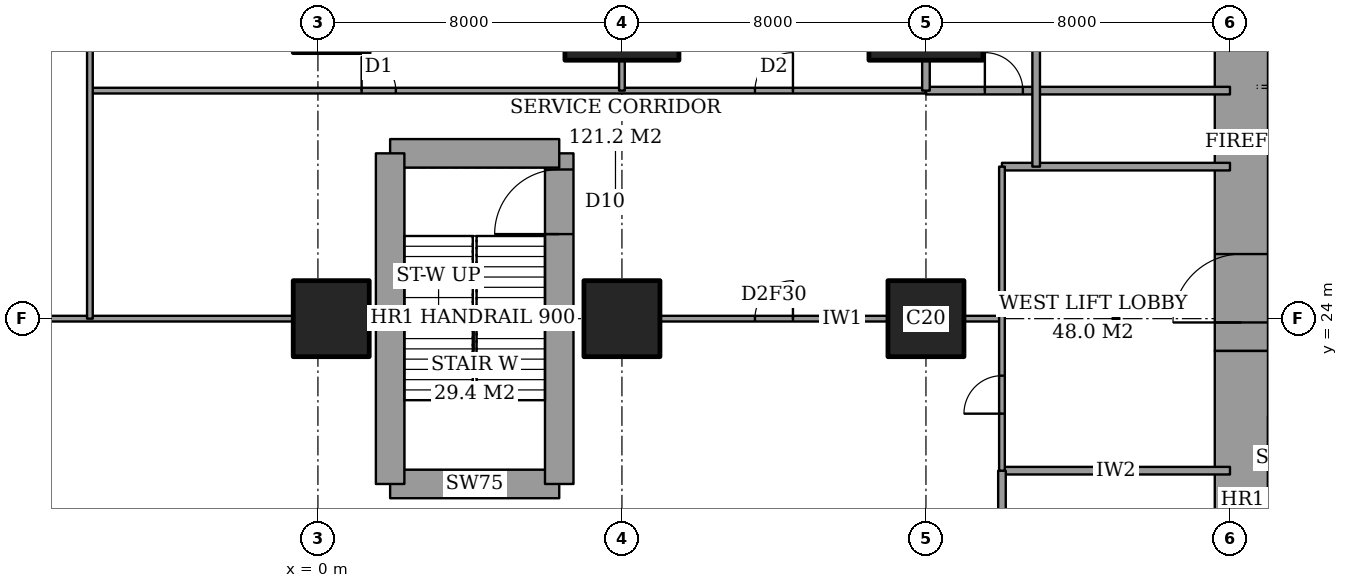
"""IFC4 building model, lengths in metres.
Left out: names, types, materials, properties, quantities, classifications, styles, units other than length and angle.
Written with IfcOpenShell. Run it as: python <this file> out.ifc"""

import sys

from ifc_helpers import new_model, si_unit, direction, frame, frame_2d, origin, origin_2d, place, context, subcontext, project, spatial, rectangle, extrude, element, fill, save


model = new_model("IFC4")
c1 = context("Model", 3, precision=1e-05, world=origin(), true_north=direction((0.0, 1.0)))
c2 = subcontext(c1, "Body", "Model", "MODEL_VIEW")
j1 = project(units=[si_unit("LENGTHUNIT", "METRE"), si_unit("PLANEANGLEUNIT", "RADIAN")], contexts=[c1])
p1 = place(None, origin())
s1 = spatial("IfcSite", under=j1, at=p1, CompositionType="ELEMENT")
p2 = place(p1, origin())
s2 = spatial("IfcBuilding", under=s1, at=p2, CompositionType="ELEMENT")
p3 = place(p2, origin())
s3 = spatial("IfcBuildingStorey", under=s2, at=p3, CompositionType="ELEMENT", Elevation=0.0)
for number, where, z_axis, x_axis in (
    (1, (0.35, 24.0, 0.0), (0.0, 0.0, 1.0), (1.0, 0.0, 0.0)),
    (2, (8.0, 24.0, 0.0), (0.0, 0.0, 1.0), (1.0, 0.0, 0.0)),
):
    element("IfcColumn", number, at=place(p3, frame(where, z_axis=z_axis, x_axis=x_axis)), inside=s3, PredefinedType="COLUMN", context=c2, shape_type="SweptSolid", body=[
        extrude(rectangle(XDim=2.0, YDim=2.0, at=origin_2d()), origin(), (0.0, 0.0, 1.0), 6.0),
    ])
p4 = place(p3, frame((8.0, 32.0, 0.0), z_axis=(0.0, 0.0, 1.0), x_axis=(1.0, 0.0, 0.0)))
e3 = element("IfcColumn", 3, at=p4, inside=s3, PredefinedType="COLUMN", context=c2, shape_type="SweptSolid", body=[
    extrude(rectangle(XDim=3.0, YDim=2.4, at=origin_2d()), origin(), (0.0, 0.0, 1.0), 6.0),
])
p5 = place(p3, frame((16.0, 24.0, 0.0), z_axis=(0.0, 0.0, 1.0), x_axis=(1.0, 0.0, 0.0)))
e4 = element("IfcColumn", 4, at=p5, inside=s3, PredefinedType="COLUMN", context=c2, shape_type="SweptSolid", body=[
    extrude(rectangle(XDim=2.0, YDim=2.0, at=origin_2d()), origin(), (0.0, 0.0, 1.0), 6.0),
])
p6 = place(p3, frame((16.0, 32.0, 0.0), z_axis=(0.0, 0.0, 1.0), x_axis=(1.0, 0.0, 0.0)))
e5 = element("IfcColumn", 5, at=p6, inside=s3, PredefinedType="COLUMN", context=c2, shape_type="SweptSolid", body=[
    extrude(rectangle(XDim=3.0, YDim=2.4, at=origin_2d()), origin(), (0.0, 0.0, 1.0), 6.0),
])
p7 = place(p3, frame((24.3, 13.0, 0.0), z_axis=(0.0, 0.0, 1.0), x_axis=(0.0, 1.0, 0.0)))
e6 = element("IfcWall", 6, at=p7, inside=s3, PredefinedType="SHEAR", context=c2, shape_type="SweptSolid", body=[
    extrude(rectangle(XDim=10.15, YDim=1.4, at=frame_2d((5.075, 0.0))), origin(), (0.0, 0.0, 1.0), 6.0),
])
p8 = place(p3, frame((24.3, 23.15, 0.0), z_axis=(0.0, 0.0, 1.0), x_axis=(0.0, 1.0, 0.0)))
e7 = element("IfcWall", 7, at=p8, inside=s3, PredefinedType="SHEAR", context=c2, shape_type="SweptSolid", body=[
    extrude(rectangle(XDim=11.85, YDim=1.4, at=frame_2d((5.925, 0.0))), origin(), (0.0, 0.0, 1.0), 6.0),
])
p9 = place(p8, frame((0.75, 0.0, 0.0)))
e8 = element("IfcOpeningElement", 8, at=p9, cuts=e7, PredefinedType="OPENING", context=c2, shape_type="SweptSolid", body=[
    extrude(rectangle(XDim=1.8, YDim=2.4, at=frame_2d((0.9, 1.2))), frame((0.0, 0.71, 0.0), z_axis=(0.0, -1.0, 0.0), x_axis=(1.0, 0.0, 0.0)), (0.0, 0.0, 1.0), 1.42),
])
p10 = place(p3, frame((1.9, 19.65, 0.0), z_axis=(0.0, 0.0, 1.0), x_axis=(1.0, 0.0, 0.0)))
e9 = element("IfcWall", 9, at=p10, inside=s3, PredefinedType="SHEAR", context=c2, shape_type="SweptSolid", body=[
    extrude(rectangle(XDim=4.45, YDim=0.75, at=frame_2d((2.225, 0.0))), origin(), (0.0, 0.0, 1.0), 6.0),
])
p11 = place(p3, frame((6.35, 19.65, 0.0), z_axis=(0.0, 0.0, 1.0), x_axis=(0.0, 1.0, 0.0)))
e10 = element("IfcWall", 10, at=p11, inside=s3, PredefinedType="SHEAR", context=c2, shape_type="SweptSolid", body=[
    extrude(rectangle(XDim=8.7, YDim=0.75, at=frame_2d((4.35, 0.0))), origin(), (0.0, 0.0, 1.0), 6.0),
])
p12 = place(p11, frame((6.575, 0.0, 0.0)))
e11 = element("IfcOpeningElement", 11, at=p12, cuts=e10, PredefinedType="OPENING", context=c2, shape_type="SweptSolid", body=[
    extrude(rectangle(XDim=1.7, YDim=2.1, at=frame_2d((0.85, 1.05))), frame((0.0, 0.385, 0.0), z_axis=(0.0, -1.0, 0.0), x_axis=(1.0, 0.0, 0.0)), (0.0, 0.0, 1.0), 0.77),
])
p13 = place(p3, frame((6.35, 28.35, 0.0), z_axis=(0.0, 0.0, 1.0), x_axis=(-1.0, 0.0, 0.0)))
e12 = element("IfcWall", 12, at=p13, inside=s3, PredefinedType="SHEAR", context=c2, shape_type="SweptSolid", body=[
    extrude(rectangle(XDim=4.45, YDim=0.75, at=frame_2d((2.225, 0.0))), origin(), (0.0, 0.0, 1.0), 6.0),
])
p14 = place(p3, frame((1.9, 28.35, 0.0), z_axis=(0.0, 0.0, 1.0), x_axis=(0.0, -1.0, 0.0)))
e13 = element("IfcWall", 13, at=p14, inside=s3, PredefinedType="SHEAR", context=c2, shape_type="SweptSolid", body=[
    extrude(rectangle(XDim=8.7, YDim=0.75, at=frame_2d((4.35, 0.0))), origin(), (0.0, 0.0, 1.0), 6.0),
])
p15 = place(p3, frame((18.0, 20.0, 0.0), z_axis=(0.0, 0.0, 1.0), x_axis=(1.0, 0.0, 0.0)))
e14 = element("IfcWall", 14, at=p15, inside=s3, PredefinedType="PARTITIONING", context=c2, shape_type="SweptSolid", body=[
    extrude(rectangle(XDim=6.0, YDim=0.2, at=frame_2d((3.0, 0.0))), origin(), (0.0, 0.0, 1.0), 5.7),
])
p16 = place(p3, frame((-7.45, 24.0, 0.0), z_axis=(0.0, 0.0, 1.0), x_axis=(1.0, 0.0, 0.0)))
e15 = element("IfcWall", 15, at=p16, inside=s3, PredefinedType="PARTITIONING", context=c2, shape_type="SweptSolid", body=[
    extrude(rectangle(XDim=6.8, YDim=0.15, at=frame_2d((3.4, 0.0))), origin(), (0.0, 0.0, 1.0), 4.3),
])
p17 = place(p3, frame((9.0, 24.0, 0.0), z_axis=(0.0, 0.0, 1.0), x_axis=(1.0, 0.0, 0.0)))
e16 = element("IfcWall", 16, at=p17, inside=s3, PredefinedType="PARTITIONING", context=c2, shape_type="SweptSolid", body=[
    extrude(rectangle(XDim=6.0, YDim=0.15, at=frame_2d((3.0, 0.0))), origin(), (0.0, 0.0, 1.0), 4.3),
])
p18 = place(p17, frame((2.5, 0.0, 0.0)))
e17 = element("IfcOpeningElement", 17, at=p18, cuts=e16, PredefinedType="OPENING", context=c2, shape_type="SweptSolid", body=[
    extrude(rectangle(XDim=1.0, YDim=2.1, at=frame_2d((0.5, 1.05))), frame((0.0, 0.085, 0.0), z_axis=(0.0, -1.0, 0.0), x_axis=(1.0, 0.0, 0.0)), (0.0, 0.0, 1.0), 0.17),
])
p19 = place(p3, frame((17.0, 24.0, 0.0), z_axis=(0.0, 0.0, 1.0), x_axis=(1.0, 0.0, 0.0)))
e18 = element("IfcWall", 18, at=p19, inside=s3, PredefinedType="PARTITIONING", context=c2, shape_type="SweptSolid", body=[
    extrude(rectangle(XDim=1.0, YDim=0.15, at=frame_2d((0.5, 0.0))), origin(), (0.0, 0.0, 1.0), 5.7),
])
p20 = place(p3, frame((18.0, 28.0, 0.0), z_axis=(0.0, 0.0, 1.0), x_axis=(1.0, 0.0, 0.0)))
e19 = element("IfcWall", 19, at=p20, inside=s3, PredefinedType="PARTITIONING", context=c2, shape_type="SweptSolid", body=[
    extrude(rectangle(XDim=6.0, YDim=0.2, at=frame_2d((3.0, 0.0))), origin(), (0.0, 0.0, 1.0), 5.7),
])
p21 = place(p3, frame((16.0, 30.0, 0.0), z_axis=(0.0, 0.0, 1.0), x_axis=(1.0, 0.0, 0.0)))
e20 = element("IfcWall", 20, at=p21, inside=s3, PredefinedType="PARTITIONING", context=c2, shape_type="SweptSolid", body=[
    extrude(rectangle(XDim=8.0, YDim=0.2, at=frame_2d((4.0, 0.0))), origin(), (0.0, 0.0, 1.0), 5.7),
])
p22 = place(p21, frame((1.55, 0.0, 0.0)))
e21 = element("IfcOpeningElement", 21, at=p22, cuts=e20, PredefinedType="OPENING", context=c2, shape_type="SweptSolid", body=[
    extrude(rectangle(XDim=1.0, YDim=2.1, at=frame_2d((0.5, 1.05))), frame((0.0, 0.11, 0.0), z_axis=(0.0, -1.0, 0.0), x_axis=(1.0, 0.0, 0.0)), (0.0, 0.0, 1.0), 0.22),
])
p23 = place(p3, frame((-6.0, 30.0, 0.0), z_axis=(0.0, 0.0, 1.0), x_axis=(1.0, 0.0, 0.0)))
e22 = element("IfcWall", 22, at=p23, inside=s3, PredefinedType="PARTITIONING", context=c2, shape_type="SweptSolid", body=[
    extrude(rectangle(XDim=22.0, YDim=0.15, at=frame_2d((11.0, 0.0))), origin(), (0.0, 0.0, 1.0), 5.7),
])
p24 = place(p23, frame((7.15, 0.0, 0.0)))
e23 = element("IfcOpeningElement", 23, at=p24, cuts=e22, PredefinedType="OPENING", context=c2, shape_type="SweptSolid", body=[
    extrude(rectangle(XDim=0.9, YDim=2.1, at=frame_2d((0.45, 1.05))), frame((0.0, 0.085, 0.0), z_axis=(0.0, -1.0, 0.0), x_axis=(1.0, 0.0, 0.0)), (0.0, 0.0, 1.0), 0.17),
])
p25 = place(p23, frame((17.5, 0.0, 0.0)))
e24 = element("IfcOpeningElement", 24, at=p25, cuts=e22, PredefinedType="OPENING", context=c2, shape_type="SweptSolid", body=[
    extrude(rectangle(XDim=1.0, YDim=2.1, at=frame_2d((0.5, 1.05))), frame((0.0, 0.085, 0.0), z_axis=(0.0, -1.0, 0.0), x_axis=(1.0, 0.0, 0.0)), (0.0, 0.0, 1.0), 0.17),
])
p26 = place(p3, frame((-6.0, 24.0, 0.0), z_axis=(0.0, 0.0, 1.0), x_axis=(0.0, 1.0, 0.0)))
e25 = element("IfcWall", 25, at=p26, inside=s3, PredefinedType="PARTITIONING", context=c2, shape_type="SweptSolid", body=[
    extrude(rectangle(XDim=24.25, YDim=0.15, at=frame_2d((12.125, 0.0))), origin(), (0.0, 0.0, 1.0), 5.7),
])
p27 = place(p26, frame((21.675, 0.0, 0.0)))
e26 = element("IfcOpeningElement", 26, at=p27, cuts=e25, PredefinedType="OPENING", context=c2, shape_type="SweptSolid", body=[
    extrude(rectangle(XDim=0.9, YDim=2.1, at=frame_2d((0.45, 1.05))), frame((0.0, 0.085, 0.0), z_axis=(0.0, -1.0, 0.0), x_axis=(1.0, 0.0, 0.0)), (0.0, 0.0, 1.0), 0.17),
])
p28 = place(p3, frame((8.0, 30.0, 0.0), z_axis=(0.0, 0.0, 1.0), x_axis=(0.0, 1.0, 0.0)))
e27 = element("IfcWall", 27, at=p28, inside=s3, PredefinedType="PARTITIONING", context=c2, shape_type="SweptSolid", body=[
    extrude(rectangle(XDim=0.8, YDim=0.15, at=frame_2d((0.4, 0.0))), origin(), (0.0, 0.0, 1.0), 4.3),
])
p29 = place(p3, frame((16.0, 30.0, 0.0), z_axis=(0.0, 0.0, 1.0), x_axis=(0.0, 1.0, 0.0)))
e28 = element("IfcWall", 28, at=p29, inside=s3, PredefinedType="PARTITIONING", context=c2, shape_type="SweptSolid", body=[
    extrude(rectangle(XDim=0.8, YDim=0.2, at=frame_2d((0.4, 0.0))), origin(), (0.0, 0.0, 1.0), 4.3),
])
p30 = place(p3, frame((18.0, 0.0, 0.0), z_axis=(0.0, 0.0, 1.0), x_axis=(0.0, 1.0, 0.0)))
e29 = element("IfcWall", 29, at=p30, inside=s3, PredefinedType="PARTITIONING", context=c2, shape_type="SweptSolid", body=[
    extrude(rectangle(XDim=20.0, YDim=0.2, at=frame_2d((10.0, 0.0))), origin(), (0.0, 0.0, 1.0), 5.7),
])
p31 = place(p3, frame((18.0, 20.0, 0.0), z_axis=(0.0, 0.0, 1.0), x_axis=(0.0, 1.0, 0.0)))
e30 = element("IfcWall", 30, at=p31, inside=s3, PredefinedType="PARTITIONING", context=c2, shape_type="SweptSolid", body=[
    extrude(rectangle(XDim=8.0, YDim=0.15, at=frame_2d((4.0, 0.0))), origin(), (0.0, 0.0, 1.0), 5.7),
])
p32 = place(p31, frame((1.5, 0.0, 0.0)))
e31 = element("IfcOpeningElement", 31, at=p32, cuts=e30, PredefinedType="OPENING", context=c2, shape_type="SweptSolid", body=[
    extrude(rectangle(XDim=1.0, YDim=2.1, at=frame_2d((0.5, 1.05))), frame((0.0, 0.085, 0.0), z_axis=(0.0, -1.0, 0.0), x_axis=(1.0, 0.0, 0.0)), (0.0, 0.0, 1.0), 0.17),
])
p33 = place(p3, frame((18.9, 28.0, 0.0), z_axis=(0.0, 0.0, 1.0), x_axis=(0.0, 1.0, 0.0)))
e32 = element("IfcWall", 32, at=p33, inside=s3, PredefinedType="PARTITIONING", context=c2, shape_type="SweptSolid", body=[
    extrude(rectangle(XDim=16.0, YDim=0.2, at=frame_2d((8.0, 0.0))), origin(), (0.0, 0.0, 1.0), 5.7),
])
p34 = place(p33, frame((3.55, 0.0, 0.0)))
e33 = element("IfcOpeningElement", 33, at=p34, cuts=e32, PredefinedType="OPENING", context=c2, shape_type="SweptSolid", body=[
    extrude(rectangle(XDim=0.9, YDim=2.1, at=frame_2d((0.45, 1.05))), frame((0.0, 0.11, 0.0), z_axis=(0.0, -1.0, 0.0), x_axis=(1.0, 0.0, 0.0)), (0.0, 0.0, 1.0), 0.22),
])
p35 = place(p33, frame((7.55, 0.0, 0.0)))
e34 = element("IfcOpeningElement", 34, at=p35, cuts=e32, PredefinedType="OPENING", context=c2, shape_type="SweptSolid", body=[
    extrude(rectangle(XDim=0.9, YDim=2.1, at=frame_2d((0.45, 1.05))), frame((0.0, 0.11, 0.0), z_axis=(0.0, -1.0, 0.0), x_axis=(1.0, 0.0, 0.0)), (0.0, 0.0, 1.0), 0.22),
])
p36 = place(p33, frame((11.05, 0.0, 0.0)))
e35 = element("IfcOpeningElement", 35, at=p36, cuts=e32, PredefinedType="OPENING", context=c2, shape_type="SweptSolid", body=[
    extrude(rectangle(XDim=0.9, YDim=2.1, at=frame_2d((0.45, 1.05))), frame((0.0, 0.11, 0.0), z_axis=(0.0, -1.0, 0.0), x_axis=(1.0, 0.0, 0.0)), (0.0, 0.0, 1.0), 0.22),
])
p37 = place(p32, origin())
e36 = element("IfcDoor", 36, at=p37, inside=s3, OperationType="SINGLE_SWING_RIGHT", PredefinedType="DOOR", context=c2, shape_type="SweptSolid", body=[
    extrude(rectangle(XDim=1.0, YDim=2.1, at=frame_2d((0.5, 1.05))), frame((0.0, 0.025, 0.0), z_axis=(0.0, -1.0, 0.0), x_axis=(1.0, 0.0, 0.0)), (0.0, 0.0, 1.0), 0.05),
])
fill(e31, e36)
p38 = place(p18, origin())
e37 = element("IfcDoor", 37, at=p38, inside=s3, OperationType="SINGLE_SWING_LEFT", PredefinedType="DOOR", context=c2, shape_type="SweptSolid", body=[
    extrude(rectangle(XDim=1.0, YDim=2.1, at=frame_2d((0.5, 1.05))), frame((0.0, 0.025, 0.0), z_axis=(0.0, -1.0, 0.0), x_axis=(1.0, 0.0, 0.0)), (0.0, 0.0, 1.0), 0.05),
])
fill(e17, e37)
p39 = place(p24, origin())
e38 = element("IfcDoor", 38, at=p39, inside=s3, OperationType="SINGLE_SWING_RIGHT", PredefinedType="DOOR", context=c2, shape_type="SweptSolid", body=[
    extrude(rectangle(XDim=0.9, YDim=2.1, at=frame_2d((0.45, 1.05))), frame((0.0, 0.025, 0.0), z_axis=(0.0, -1.0, 0.0), x_axis=(1.0, 0.0, 0.0)), (0.0, 0.0, 1.0), 0.05),
])
fill(e23, e38)
p40 = place(p25, origin())
e39 = element("IfcDoor", 39, at=p40, inside=s3, OperationType="SINGLE_SWING_LEFT", PredefinedType="DOOR", context=c2, shape_type="SweptSolid", body=[
    extrude(rectangle(XDim=1.0, YDim=2.1, at=frame_2d((0.5, 1.05))), frame((0.0, 0.025, 0.0), z_axis=(0.0, -1.0, 0.0), x_axis=(1.0, 0.0, 0.0)), (0.0, 0.0, 1.0), 0.05),
])
fill(e24, e39)
p41 = place(p22, origin())
e40 = element("IfcDoor", 40, at=p41, inside=s3, OperationType="SINGLE_SWING_RIGHT", PredefinedType="DOOR", context=c2, shape_type="SweptSolid", body=[
    extrude(rectangle(XDim=1.0, YDim=2.1, at=frame_2d((0.5, 1.05))), frame((0.0, 0.025, 0.0), z_axis=(0.0, -1.0, 0.0), x_axis=(1.0, 0.0, 0.0)), (0.0, 0.0, 1.0), 0.05),
])
fill(e21, e40)
p42 = place(p9, origin())
e41 = element("IfcDoor", 41, at=p42, inside=s3, OperationType="DOUBLE_DOOR_DOUBLE_SWING", PredefinedType="DOOR", context=c2, shape_type="SweptSolid", body=[
    extrude(rectangle(XDim=1.8, YDim=2.4, at=frame_2d((0.9, 1.2))), frame((0.0, -0.175, 0.0), z_axis=(0.0, -1.0, 0.0), x_axis=(1.0, 0.0, 0.0)), (0.0, 0.0, 1.0), 0.05),
])
fill(e8, e41)
p43 = place(p12, origin())
e42 = element("IfcDoor", 42, at=p43, inside=s3, OperationType="DOUBLE_DOOR_SINGLE_SWING", PredefinedType="DOOR", context=c2, shape_type="SweptSolid", body=[
    extrude(rectangle(XDim=1.7, YDim=2.1, at=frame_2d((0.85, 1.05))), frame((0.0, 0.025, 0.0), z_axis=(0.0, -1.0, 0.0), x_axis=(1.0, 0.0, 0.0)), (0.0, 0.0, 1.0), 0.05),
])
fill(e11, e42)
save(model, sys.argv[1])
